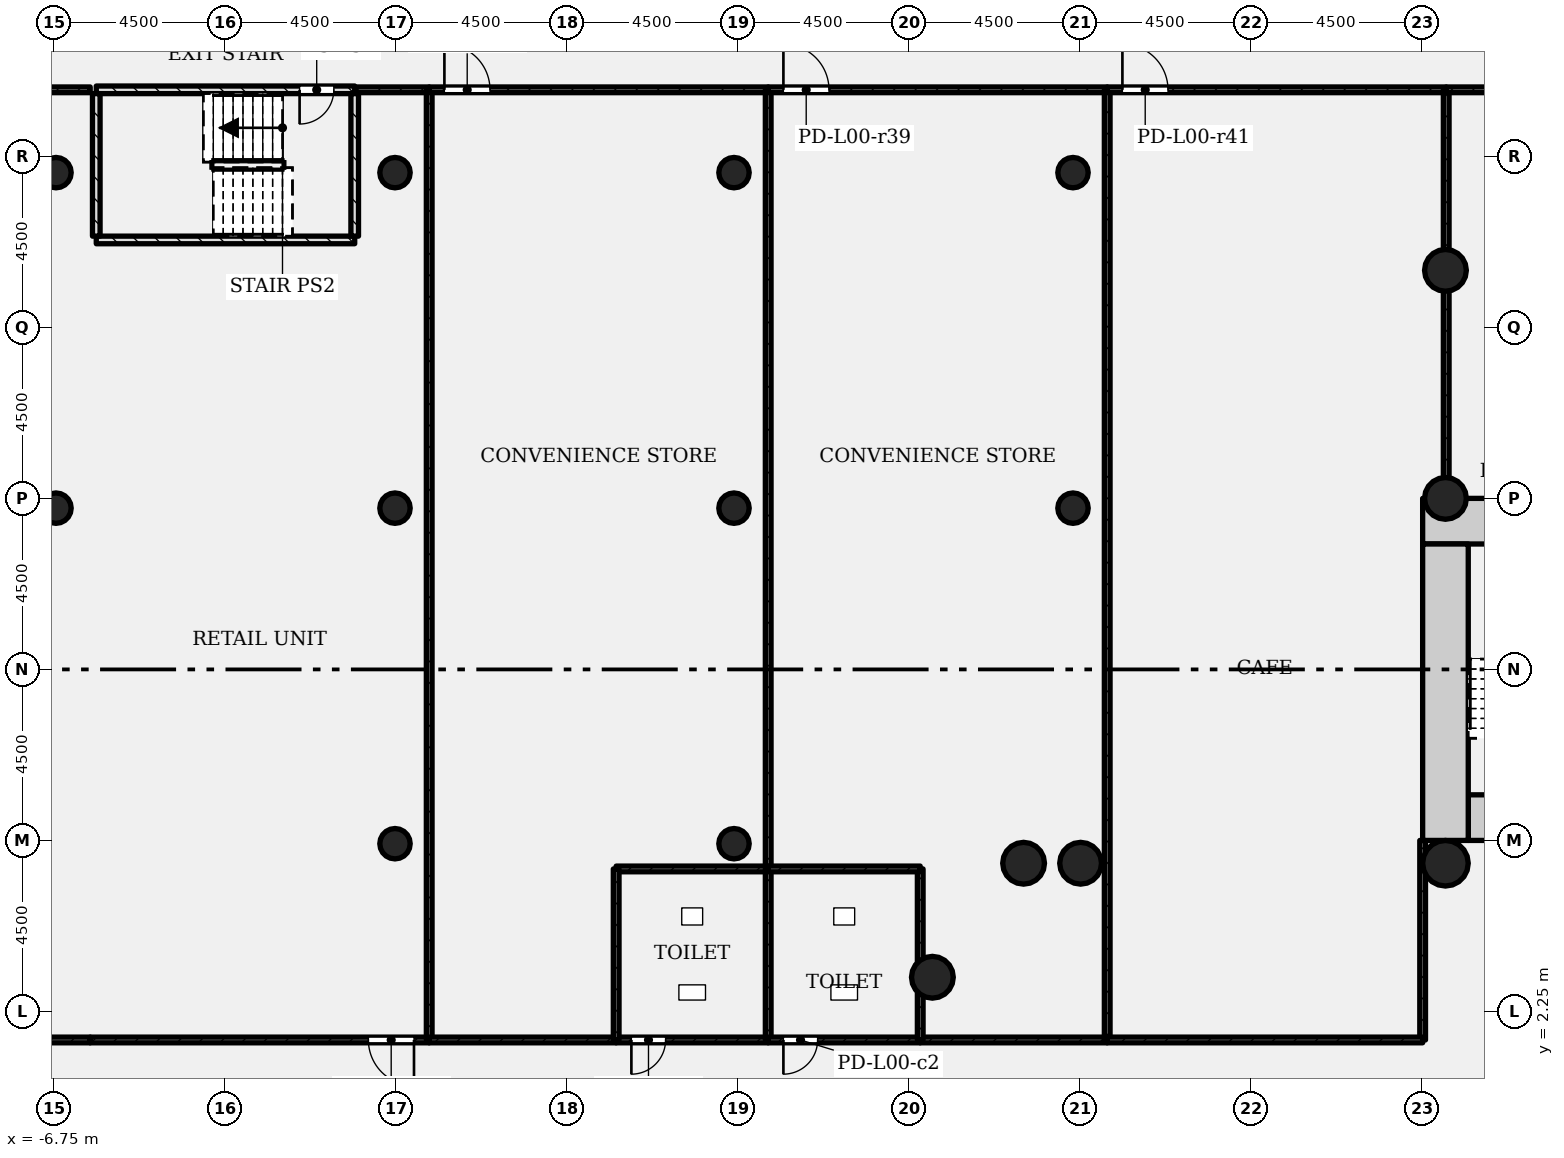
"""IFC4 building model, lengths in metres.
Left out: names, types, materials, properties, quantities, classifications, styles, units other than length and angle.
Written with IfcOpenShell. Run it as: python <this file> out.ifc"""

import sys

from ifc_helpers import new_model, si_unit, direction, frame, frame_2d, origin, origin_2d, place, context, subcontext, project, spatial, rectangle, hollow_circle, extrude, element, fill, save


model = new_model("IFC4")
c1 = context("Model", 3, precision=1e-05, world=origin(), true_north=direction((0.0, 1.0)))
c2 = subcontext(c1, "Body", "Model", "MODEL_VIEW")
j1 = project(units=[si_unit("LENGTHUNIT", "METRE"), si_unit("PLANEANGLEUNIT", "RADIAN")], contexts=[c1])
p1 = place(None, origin())
s1 = spatial("IfcSite", under=j1, at=p1, CompositionType="ELEMENT")
p2 = place(p1, origin())
s2 = spatial("IfcBuilding", under=s1, at=p2, CompositionType="ELEMENT")
p3 = place(p2, origin())
s3 = spatial("IfcBuildingStorey", under=s2, at=p3, CompositionType="ELEMENT", Elevation=0.0)
p4 = place(p3, frame((30.45, 7.35, -0.4), z_axis=(0.0, 0.0, 1.0), x_axis=(1.0, 0.0, 0.0)))
e1 = element("IfcWall", 1, at=p4, inside=s3, PredefinedType="SHEAR", context=c2, shape_type="SweptSolid", body=[
    extrude(rectangle(XDim=12.3, YDim=1.2, at=frame_2d((6.15, 0.0))), origin(), (0.0, 0.0, 1.0), 6.4),
])
p5 = place(p4, frame((4.65, 0.0, 0.4)))
e2 = element("IfcOpeningElement", 2, at=p5, cuts=e1, PredefinedType="OPENING", context=c2, shape_type="SweptSolid", body=[
    extrude(rectangle(XDim=1.8, YDim=2.1, at=frame_2d((0.9, 1.05))), frame((0.0, 0.61, 0.0), z_axis=(0.0, -1.0, 0.0), x_axis=(1.0, 0.0, 0.0)), (0.0, 0.0, 1.0), 1.22),
])
p6 = place(p3, frame((41.55, 15.15, -0.4), z_axis=(0.0, 0.0, 1.0), x_axis=(-1.0, 0.0, 0.0)))
e3 = element("IfcWall", 3, at=p6, inside=s3, PredefinedType="SHEAR", context=c2, shape_type="SweptSolid", body=[
    extrude(rectangle(XDim=12.3, YDim=1.2, at=frame_2d((6.15, 0.0))), origin(), (0.0, 0.0, 1.0), 6.4),
])
p7 = place(p6, frame((4.65, 0.0, 0.4)))
e4 = element("IfcOpeningElement", 4, at=p7, cuts=e3, PredefinedType="OPENING", context=c2, shape_type="SweptSolid", body=[
    extrude(rectangle(XDim=1.8, YDim=2.1, at=frame_2d((0.9, 1.05))), frame((0.0, 0.61, 0.0), z_axis=(0.0, -1.0, 0.0), x_axis=(1.0, 0.0, 0.0)), (0.0, 0.0, 1.0), 1.22),
])
p8 = place(p3, frame((29.85, 14.55, -0.4), z_axis=(0.0, 0.0, 1.0), x_axis=(0.0, -1.0, 0.0)))
e5 = element("IfcWall", 5, at=p8, inside=s3, PredefinedType="SHEAR", context=c2, shape_type="SweptSolid", body=[
    extrude(rectangle(XDim=7.8, YDim=1.2, at=frame_2d((3.9, 0.0))), origin(), (0.0, 0.0, 1.0), 6.4),
])
for number, where, z_axis, x_axis in (
    (6, (29.85, 15.75, -0.4), (0.0, 0.0, 1.0), (1.0, 0.0, 0.0)),
    (7, (29.85, 21.75, -0.4), (0.0, 0.0, 1.0), (1.0, 0.0, 0.0)),
    (8, (20.25, 6.15, -0.4), (0.0, 0.0, 1.0), (1.0, 0.0, 0.0)),
    (9, (18.75, 6.15, -0.4), (0.0, 0.0, 1.0), (1.0, 0.0, 0.0)),
    (10, (16.35, 3.15, -0.4), (0.0, 0.0, 1.0), (1.0, 0.0, 0.0)),
):
    element("IfcColumn", number, at=place(p3, frame(where, z_axis=z_axis, x_axis=x_axis)), inside=s3, PredefinedType="COLUMN", context=c2, shape_type="SweptSolid", body=[
        extrude(hollow_circle(Radius=0.55, WallThickness=0.04, at=origin_2d()), origin(), (0.0, 0.0, 1.0), 6.4),
    ])
p9 = place(p3, frame((29.85, 6.15, -0.4), z_axis=(0.0, 0.0, 1.0), x_axis=(1.0, 0.0, 0.0)))
e11 = element("IfcColumn", 11, at=p9, inside=s3, PredefinedType="COLUMN", context=c2, shape_type="SweptSolid", body=[
    extrude(hollow_circle(Radius=0.6, WallThickness=0.045, at=origin_2d()), origin(), (0.0, 0.0, 1.0), 6.4),
])
for number, where, z_axis, x_axis in (
    (12, (2.21, 6.664, -0.4), (0.0, 0.0, 1.0), (1.0, 0.0, 0.0)),
    (13, (11.13, 6.664, -0.4), (0.0, 0.0, 1.0), (1.0, 0.0, 0.0)),
    (14, (-6.71, 15.493, -0.4), (0.0, 0.0, 1.0), (1.0, 0.0, 0.0)),
    (15, (2.21, 15.493, -0.4), (0.0, 0.0, 1.0), (1.0, 0.0, 0.0)),
    (16, (11.13, 15.493, -0.4), (0.0, 0.0, 1.0), (1.0, 0.0, 0.0)),
    (17, (20.05, 15.493, -0.4), (0.0, 0.0, 1.0), (1.0, 0.0, 0.0)),
    (18, (-6.71, 24.321, -0.4), (0.0, 0.0, 1.0), (1.0, 0.0, 0.0)),
    (19, (2.21, 24.321, -0.4), (0.0, 0.0, 1.0), (1.0, 0.0, 0.0)),
    (20, (11.13, 24.321, -0.4), (0.0, 0.0, 1.0), (1.0, 0.0, 0.0)),
    (21, (20.05, 24.321, -0.4), (0.0, 0.0, 1.0), (1.0, 0.0, 0.0)),
):
    element("IfcColumn", number, at=place(p3, frame(where, z_axis=z_axis, x_axis=x_axis)), inside=s3, PredefinedType="COLUMN", context=c2, shape_type="SweptSolid", body=[
        extrude(hollow_circle(Radius=0.4, WallThickness=0.028, at=origin_2d()), origin(), (0.0, 0.0, 1.0), 6.4),
    ])
p10 = place(p3, frame((-14.73, 26.5, 0.0), z_axis=(0.0, 0.0, 1.0), x_axis=(1.0, 0.0, 0.0)))
e22 = element("IfcWall", 22, at=p10, inside=s3, PredefinedType="PARTITIONING", context=c2, shape_type="SweptSolid", body=[
    extrude(rectangle(XDim=8.92, YDim=0.15, at=frame_2d((4.46, 0.0))), origin(), (0.0, 0.0, 1.0), 5.58),
])
p11 = place(p10, frame((0.4, 0.0, 0.0)))
e23 = element("IfcOpeningElement", 23, at=p11, cuts=e22, PredefinedType="OPENING", context=c2, shape_type="SweptSolid", body=[
    extrude(rectangle(XDim=1.2, YDim=2.1, at=frame_2d((0.6, 1.05))), frame((0.0, 0.085, 0.0), z_axis=(0.0, -1.0, 0.0), x_axis=(1.0, 0.0, 0.0)), (0.0, 0.0, 1.0), 0.17),
])
p12 = place(p3, frame((-5.81, 1.5, 0.0), z_axis=(0.0, 0.0, 1.0), x_axis=(-1.0, 0.0, 0.0)))
e24 = element("IfcWall", 24, at=p12, inside=s3, PredefinedType="PARTITIONING", context=c2, shape_type="SweptSolid", body=[
    extrude(rectangle(XDim=8.92, YDim=0.15, at=frame_2d((4.46, 0.0))), origin(), (0.0, 0.0, 1.0), 5.58),
])
p13 = place(p3, frame((-5.65, 26.5, 0.0), z_axis=(0.0, 0.0, 1.0), x_axis=(1.0, 0.0, 0.0)))
e25 = element("IfcWall", 25, at=p13, inside=s3, PredefinedType="SHEAR", context=c2, shape_type="SweptSolid", body=[
    extrude(rectangle(XDim=6.8, YDim=0.2, at=frame_2d((3.4, 0.0))), origin(), (0.0, 0.0, 1.0), 5.58),
])
p14 = place(p13, frame((5.35, 0.0, 0.0)))
e26 = element("IfcOpeningElement", 26, at=p14, cuts=e25, PredefinedType="OPENING", context=c2, shape_type="SweptSolid", body=[
    extrude(rectangle(XDim=0.9, YDim=2.1, at=frame_2d((0.45, 1.05))), frame((0.0, 0.11, 0.0), z_axis=(0.0, -1.0, 0.0), x_axis=(1.0, 0.0, 0.0)), (0.0, 0.0, 1.0), 0.22),
])
p15 = place(p3, frame((-5.65, 22.55, 0.0), z_axis=(0.0, 0.0, 1.0), x_axis=(1.0, 0.0, 0.0)))
e27 = element("IfcWall", 27, at=p15, inside=s3, PredefinedType="SHEAR", context=c2, shape_type="SweptSolid", body=[
    extrude(rectangle(XDim=6.8, YDim=0.2, at=frame_2d((3.4, 0.0))), origin(), (0.0, 0.0, 1.0), 5.58),
])
for number, where, z_axis, x_axis in (
    (28, (-5.65, 22.65, 0.0), (0.0, 0.0, 1.0), (0.0, 1.0, 0.0)),
    (29, (1.15, 22.65, 0.0), (0.0, 0.0, 1.0), (0.0, 1.0, 0.0)),
):
    element("IfcWall", number, at=place(p3, frame(where, z_axis=z_axis, x_axis=x_axis)), inside=s3, PredefinedType="SHEAR", context=c2, shape_type="SweptSolid", body=[
        extrude(rectangle(XDim=3.75, YDim=0.2, at=frame_2d((1.875, 0.0))), origin(), (0.0, 0.0, 1.0), 5.58),
    ])
p16 = place(p3, frame((1.15, 26.5, 0.0), z_axis=(0.0, 0.0, 1.0), x_axis=(1.0, 0.0, 0.0)))
e30 = element("IfcWall", 30, at=p16, inside=s3, PredefinedType="PARTITIONING", context=c2, shape_type="SweptSolid", body=[
    extrude(rectangle(XDim=1.96, YDim=0.15, at=frame_2d((0.98, 0.0))), origin(), (0.0, 0.0, 1.0), 5.58),
])
p17 = place(p3, frame((3.11, 1.5, 0.0), z_axis=(0.0, 0.0, 1.0), x_axis=(-1.0, 0.0, 0.0)))
e31 = element("IfcWall", 31, at=p17, inside=s3, PredefinedType="PARTITIONING", context=c2, shape_type="SweptSolid", body=[
    extrude(rectangle(XDim=8.92, YDim=0.15, at=frame_2d((4.46, 0.0))), origin(), (0.0, 0.0, 1.0), 5.58),
])
p18 = place(p17, frame((0.4, 0.0, 0.0)))
e32 = element("IfcOpeningElement", 32, at=p18, cuts=e31, PredefinedType="OPENING", context=c2, shape_type="SweptSolid", body=[
    extrude(rectangle(XDim=1.2, YDim=2.1, at=frame_2d((0.6, 1.05))), frame((0.0, 0.085, 0.0), z_axis=(0.0, -1.0, 0.0), x_axis=(1.0, 0.0, 0.0)), (0.0, 0.0, 1.0), 0.17),
])
p19 = place(p3, frame((3.11, 26.5, 0.0), z_axis=(0.0, 0.0, 1.0), x_axis=(0.0, -1.0, 0.0)))
e33 = element("IfcWall", 33, at=p19, inside=s3, PredefinedType="PARTITIONING", context=c2, shape_type="SweptSolid", body=[
    extrude(rectangle(XDim=25.0, YDim=0.15, at=frame_2d((12.5, 0.0))), origin(), (0.0, 0.0, 1.0), 5.58),
])
p20 = place(p3, frame((8.03, 1.5, 0.0), z_axis=(0.0, 0.0, 1.0), x_axis=(-1.0, 0.0, 0.0)))
e34 = element("IfcWall", 34, at=p20, inside=s3, PredefinedType="PARTITIONING", context=c2, shape_type="SweptSolid", body=[
    extrude(rectangle(XDim=4.92, YDim=0.15, at=frame_2d((2.46, 0.0))), origin(), (0.0, 0.0, 1.0), 5.58),
])
p21 = place(p3, frame((3.11, 26.5, 0.0), z_axis=(0.0, 0.0, 1.0), x_axis=(1.0, 0.0, 0.0)))
e35 = element("IfcWall", 35, at=p21, inside=s3, PredefinedType="PARTITIONING", context=c2, shape_type="SweptSolid", body=[
    extrude(rectangle(XDim=8.92, YDim=0.15, at=frame_2d((4.46, 0.0))), origin(), (0.0, 0.0, 1.0), 5.58),
])
p22 = place(p21, frame((0.4, 0.0, 0.0)))
e36 = element("IfcOpeningElement", 36, at=p22, cuts=e35, PredefinedType="OPENING", context=c2, shape_type="SweptSolid", body=[
    extrude(rectangle(XDim=1.2, YDim=2.1, at=frame_2d((0.6, 1.05))), frame((0.0, 0.085, 0.0), z_axis=(0.0, -1.0, 0.0), x_axis=(1.0, 0.0, 0.0)), (0.0, 0.0, 1.0), 0.17),
])
p23 = place(p3, frame((12.03, 26.5, 0.0), z_axis=(0.0, 0.0, 1.0), x_axis=(0.0, -1.0, 0.0)))
e37 = element("IfcWall", 37, at=p23, inside=s3, PredefinedType="PARTITIONING", context=c2, shape_type="SweptSolid", body=[
    extrude(rectangle(XDim=20.5, YDim=0.15, at=frame_2d((10.25, 0.0))), origin(), (0.0, 0.0, 1.0), 5.58),
])
p24 = place(p3, frame((12.03, 26.5, 0.0), z_axis=(0.0, 0.0, 1.0), x_axis=(1.0, 0.0, 0.0)))
e38 = element("IfcWall", 38, at=p24, inside=s3, PredefinedType="PARTITIONING", context=c2, shape_type="SweptSolid", body=[
    extrude(rectangle(XDim=8.92, YDim=0.15, at=frame_2d((4.46, 0.0))), origin(), (0.0, 0.0, 1.0), 5.58),
])
p25 = place(p24, frame((0.4, 0.0, 0.0)))
e39 = element("IfcOpeningElement", 39, at=p25, cuts=e38, PredefinedType="OPENING", context=c2, shape_type="SweptSolid", body=[
    extrude(rectangle(XDim=1.2, YDim=2.1, at=frame_2d((0.6, 1.05))), frame((0.0, 0.085, 0.0), z_axis=(0.0, -1.0, 0.0), x_axis=(1.0, 0.0, 0.0)), (0.0, 0.0, 1.0), 0.17),
])
p26 = place(p3, frame((20.95, 1.5, 0.0), z_axis=(0.0, 0.0, 1.0), x_axis=(-1.0, 0.0, 0.0)))
e40 = element("IfcWall", 40, at=p26, inside=s3, PredefinedType="PARTITIONING", context=c2, shape_type="SweptSolid", body=[
    extrude(rectangle(XDim=4.92, YDim=0.15, at=frame_2d((2.46, 0.0))), origin(), (0.0, 0.0, 1.0), 5.58),
])
p27 = place(p3, frame((20.95, 26.5, 0.0), z_axis=(0.0, 0.0, 1.0), x_axis=(0.0, -1.0, 0.0)))
e41 = element("IfcWall", 41, at=p27, inside=s3, PredefinedType="PARTITIONING", context=c2, shape_type="SweptSolid", body=[
    extrude(rectangle(XDim=25.0, YDim=0.15, at=frame_2d((12.5, 0.0))), origin(), (0.0, 0.0, 1.0), 5.58),
])
p28 = place(p3, frame((20.95, 26.5, 0.0), z_axis=(0.0, 0.0, 1.0), x_axis=(1.0, 0.0, 0.0)))
e42 = element("IfcWall", 42, at=p28, inside=s3, PredefinedType="PARTITIONING", context=c2, shape_type="SweptSolid", body=[
    extrude(rectangle(XDim=8.92, YDim=0.15, at=frame_2d((4.46, 0.0))), origin(), (0.0, 0.0, 1.0), 5.58),
])
p29 = place(p28, frame((0.4, 0.0, 0.0)))
e43 = element("IfcOpeningElement", 43, at=p29, cuts=e42, PredefinedType="OPENING", context=c2, shape_type="SweptSolid", body=[
    extrude(rectangle(XDim=1.2, YDim=2.1, at=frame_2d((0.6, 1.05))), frame((0.0, 0.085, 0.0), z_axis=(0.0, -1.0, 0.0), x_axis=(1.0, 0.0, 0.0)), (0.0, 0.0, 1.0), 0.17),
])
p30 = place(p3, frame((29.25, 6.75, 0.0), z_axis=(0.0, 0.0, 1.0), x_axis=(0.0, -1.0, 0.0)))
e44 = element("IfcWall", 44, at=p30, inside=s3, PredefinedType="PARTITIONING", context=c2, shape_type="SweptSolid", body=[
    extrude(rectangle(XDim=5.25, YDim=0.15, at=frame_2d((2.625, 0.0))), origin(), (0.0, 0.0, 1.0), 5.58),
])
p31 = place(p3, frame((29.25, 1.5, 0.0), z_axis=(0.0, 0.0, 1.0), x_axis=(-1.0, 0.0, 0.0)))
e45 = element("IfcWall", 45, at=p31, inside=s3, PredefinedType="PARTITIONING", context=c2, shape_type="SweptSolid", body=[
    extrude(rectangle(XDim=8.3, YDim=0.15, at=frame_2d((4.15, 0.0))), origin(), (0.0, 0.0, 1.0), 5.58),
])
p32 = place(p3, frame((29.87, 26.5, 0.0), z_axis=(0.0, 0.0, 1.0), x_axis=(0.0, -1.0, 0.0)))
e46 = element("IfcWall", 46, at=p32, inside=s3, PredefinedType="PARTITIONING", context=c2, shape_type="SweptSolid", body=[
    extrude(rectangle(XDim=10.75, YDim=0.15, at=frame_2d((5.375, 0.0))), origin(), (0.0, 0.0, 1.0), 5.58),
])
p33 = place(p3, frame((29.87, 26.5, 0.0), z_axis=(0.0, 0.0, 1.0), x_axis=(1.0, 0.0, 0.0)))
e47 = element("IfcWall", 47, at=p33, inside=s3, PredefinedType="PARTITIONING", context=c2, shape_type="SweptSolid", body=[
    extrude(rectangle(XDim=4.63, YDim=0.15, at=frame_2d((2.315, 0.0))), origin(), (0.0, 0.0, 1.0), 5.58),
])
p34 = place(p3, frame((8.03, 1.5, 0.0), z_axis=(0.0, 0.0, 1.0), x_axis=(1.0, 0.0, 0.0)))
e48 = element("IfcWall", 48, at=p34, inside=s3, PredefinedType="PARTITIONING", context=c2, shape_type="SweptSolid", body=[
    extrude(rectangle(XDim=4.0, YDim=0.15, at=frame_2d((2.0, 0.0))), origin(), (0.0, 0.0, 1.0), 5.58),
])
p35 = place(p34, frame((0.4, 0.0, 0.0)))
e49 = element("IfcOpeningElement", 49, at=p35, cuts=e48, PredefinedType="OPENING", context=c2, shape_type="SweptSolid", body=[
    extrude(rectangle(XDim=0.9, YDim=2.1, at=frame_2d((0.45, 1.05))), frame((0.0, 0.085, 0.0), z_axis=(0.0, -1.0, 0.0), x_axis=(1.0, 0.0, 0.0)), (0.0, 0.0, 1.0), 0.17),
])
p36 = place(p3, frame((12.03, 6.0, 0.0), z_axis=(0.0, 0.0, 1.0), x_axis=(-1.0, 0.0, 0.0)))
e50 = element("IfcWall", 50, at=p36, inside=s3, PredefinedType="PARTITIONING", context=c2, shape_type="SweptSolid", body=[
    extrude(rectangle(XDim=4.0, YDim=0.15, at=frame_2d((2.0, 0.0))), origin(), (0.0, 0.0, 1.0), 5.58),
])
for number, where, z_axis, x_axis in (
    (51, (8.03, 6.0, 0.0), (0.0, 0.0, 1.0), (0.0, -1.0, 0.0)),
    (52, (12.03, 1.5, 0.0), (0.0, 0.0, 1.0), (0.0, 1.0, 0.0)),
):
    element("IfcWall", number, at=place(p3, frame(where, z_axis=z_axis, x_axis=x_axis)), inside=s3, PredefinedType="PARTITIONING", context=c2, shape_type="SweptSolid", body=[
        extrude(rectangle(XDim=4.5, YDim=0.15, at=frame_2d((2.25, 0.0))), origin(), (0.0, 0.0, 1.0), 5.58),
    ])
p37 = place(p3, frame((12.03, 1.5, 0.0), z_axis=(0.0, 0.0, 1.0), x_axis=(1.0, 0.0, 0.0)))
e53 = element("IfcWall", 53, at=p37, inside=s3, PredefinedType="PARTITIONING", context=c2, shape_type="SweptSolid", body=[
    extrude(rectangle(XDim=4.0, YDim=0.15, at=frame_2d((2.0, 0.0))), origin(), (0.0, 0.0, 1.0), 5.58),
])
p38 = place(p37, frame((0.4, 0.0, 0.0)))
e54 = element("IfcOpeningElement", 54, at=p38, cuts=e53, PredefinedType="OPENING", context=c2, shape_type="SweptSolid", body=[
    extrude(rectangle(XDim=0.9, YDim=2.1, at=frame_2d((0.45, 1.05))), frame((0.0, 0.085, 0.0), z_axis=(0.0, -1.0, 0.0), x_axis=(1.0, 0.0, 0.0)), (0.0, 0.0, 1.0), 0.17),
])
p39 = place(p3, frame((16.03, 1.5, 0.0), z_axis=(0.0, 0.0, 1.0), x_axis=(0.0, 1.0, 0.0)))
e55 = element("IfcWall", 55, at=p39, inside=s3, PredefinedType="PARTITIONING", context=c2, shape_type="SweptSolid", body=[
    extrude(rectangle(XDim=4.5, YDim=0.15, at=frame_2d((2.25, 0.0))), origin(), (0.0, 0.0, 1.0), 5.58),
])
p40 = place(p3, frame((16.03, 6.0, 0.0), z_axis=(0.0, 0.0, 1.0), x_axis=(-1.0, 0.0, 0.0)))
e56 = element("IfcWall", 56, at=p40, inside=s3, PredefinedType="PARTITIONING", context=c2, shape_type="SweptSolid", body=[
    extrude(rectangle(XDim=4.0, YDim=0.15, at=frame_2d((2.0, 0.0))), origin(), (0.0, 0.0, 1.0), 5.58),
])
p41 = place(p14, origin())
e57 = element("IfcDoor", 57, at=p41, inside=s3, OperationType="SINGLE_SWING_LEFT", PredefinedType="DOOR", context=c2, shape_type="SweptSolid", body=[
    extrude(rectangle(XDim=0.9, YDim=2.1, at=frame_2d((0.45, 1.05))), frame((0.0, 0.025, 0.0), z_axis=(0.0, -1.0, 0.0), x_axis=(1.0, 0.0, 0.0)), (0.0, 0.0, 1.0), 0.05),
])
fill(e26, e57)
p42 = place(p18, origin())
e58 = element("IfcDoor", 58, at=p42, inside=s3, OperationType="SINGLE_SWING_RIGHT", PredefinedType="DOOR", context=c2, shape_type="SweptSolid", body=[
    extrude(rectangle(XDim=1.2, YDim=2.1, at=frame_2d((0.6, 1.05))), frame((0.0, 0.025, 0.0), z_axis=(0.0, -1.0, 0.0), x_axis=(1.0, 0.0, 0.0)), (0.0, 0.0, 1.0), 0.05),
])
fill(e32, e58)
p43 = place(p22, origin())
e59 = element("IfcDoor", 59, at=p43, inside=s3, OperationType="SINGLE_SWING_RIGHT", PredefinedType="DOOR", context=c2, shape_type="SweptSolid", body=[
    extrude(rectangle(XDim=1.2, YDim=2.1, at=frame_2d((0.6, 1.05))), frame((0.0, 0.025, 0.0), z_axis=(0.0, -1.0, 0.0), x_axis=(1.0, 0.0, 0.0)), (0.0, 0.0, 1.0), 0.05),
])
fill(e36, e59)
p44 = place(p25, origin())
e60 = element("IfcDoor", 60, at=p44, inside=s3, OperationType="SINGLE_SWING_RIGHT", PredefinedType="DOOR", context=c2, shape_type="SweptSolid", body=[
    extrude(rectangle(XDim=1.2, YDim=2.1, at=frame_2d((0.6, 1.05))), frame((0.0, 0.025, 0.0), z_axis=(0.0, -1.0, 0.0), x_axis=(1.0, 0.0, 0.0)), (0.0, 0.0, 1.0), 0.05),
])
fill(e39, e60)
p45 = place(p29, origin())
e61 = element("IfcDoor", 61, at=p45, inside=s3, OperationType="SINGLE_SWING_RIGHT", PredefinedType="DOOR", context=c2, shape_type="SweptSolid", body=[
    extrude(rectangle(XDim=1.2, YDim=2.1, at=frame_2d((0.6, 1.05))), frame((0.0, 0.025, 0.0), z_axis=(0.0, -1.0, 0.0), x_axis=(1.0, 0.0, 0.0)), (0.0, 0.0, 1.0), 0.05),
])
fill(e43, e61)
p46 = place(p35, origin())
e62 = element("IfcDoor", 62, at=p46, inside=s3, OperationType="SINGLE_SWING_LEFT", PredefinedType="DOOR", context=c2, shape_type="SweptSolid", body=[
    extrude(rectangle(XDim=0.9, YDim=2.1, at=frame_2d((0.45, 1.05))), frame((0.0, 0.025, 0.0), z_axis=(0.0, -1.0, 0.0), x_axis=(1.0, 0.0, 0.0)), (0.0, 0.0, 1.0), 0.05),
])
fill(e49, e62)
p47 = place(p38, origin())
e63 = element("IfcDoor", 63, at=p47, inside=s3, OperationType="SINGLE_SWING_LEFT", PredefinedType="DOOR", context=c2, shape_type="SweptSolid", body=[
    extrude(rectangle(XDim=0.9, YDim=2.1, at=frame_2d((0.45, 1.05))), frame((0.0, 0.025, 0.0), z_axis=(0.0, -1.0, 0.0), x_axis=(1.0, 0.0, 0.0)), (0.0, 0.0, 1.0), 0.05),
])
fill(e54, e63)
save(model, sys.argv[1])
